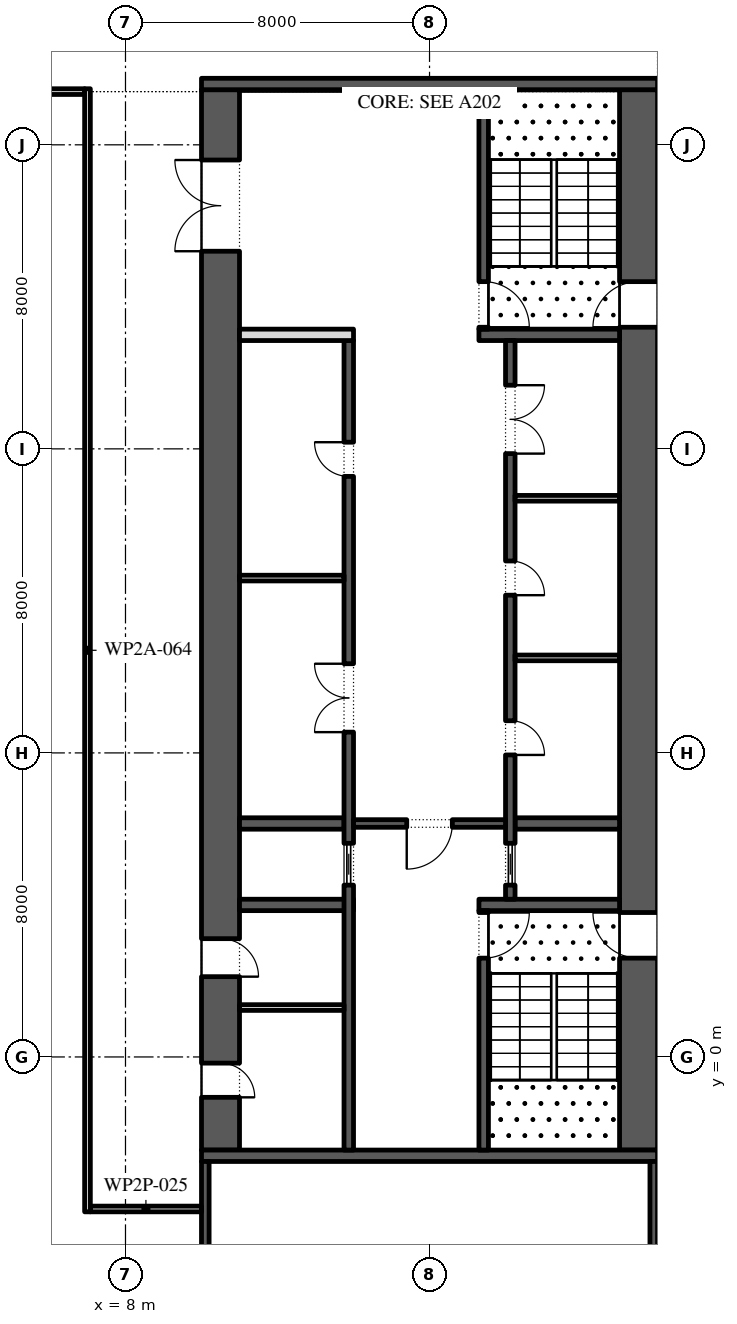
"""IFC4 building model, lengths in metres.
Left out: names, types, materials, properties, quantities, classifications, styles, units other than length and angle.
Written with IfcOpenShell. Run it as: python <this file> out.ifc"""

import sys

from ifc_helpers import new_model, si_unit, direction, frame, frame_2d, origin, place, context, subcontext, project, spatial, rectangle, extrude, element, fill, save


model = new_model("IFC4")
c1 = context("Model", 3, precision=1e-05, world=origin(), true_north=direction((0.0, 1.0)))
c2 = subcontext(c1, "Body", "Model", "MODEL_VIEW")
j1 = project(units=[si_unit("LENGTHUNIT", "METRE"), si_unit("PLANEANGLEUNIT", "RADIAN")], contexts=[c1])
p1 = place(None, origin())
s1 = spatial("IfcSite", under=j1, at=p1, CompositionType="ELEMENT")
p2 = place(p1, origin())
s2 = spatial("IfcBuilding", under=s1, at=p2, CompositionType="ELEMENT")
p3 = place(p2, frame((0.0, 0.0, -5.2)))
s3 = spatial("IfcBuildingStorey", under=s2, at=p3, CompositionType="ELEMENT", Elevation=-5.2)
p4 = place(p3, frame((21.5, -2.45, 0.0), z_axis=(0.0, 0.0, 1.0), x_axis=(0.0, 1.0, 0.0)))
e1 = element("IfcWall", 1, at=p4, inside=s3, PredefinedType="SHEAR", context=c2, shape_type="SweptSolid", body=[
    extrude(rectangle(XDim=27.9, YDim=1.0, at=frame_2d((13.95, 0.0))), origin(), (0.0, 0.0, 1.0), 4.9),
])
p5 = place(p4, frame((5.05, 0.0, 0.0)))
e2 = element("IfcOpeningElement", 2, at=p5, cuts=e1, PredefinedType="OPENING", context=c2, shape_type="SweptSolid", body=[
    extrude(rectangle(XDim=1.2, YDim=2.1, at=frame_2d((0.6, 1.05))), frame((0.0, 0.51, 0.0), z_axis=(0.0, -1.0, 0.0), x_axis=(1.0, 0.0, 0.0)), (0.0, 0.0, 1.0), 1.02),
])
p6 = place(p4, frame((21.65, 0.0, 0.0)))
e3 = element("IfcOpeningElement", 3, at=p6, cuts=e1, PredefinedType="OPENING", context=c2, shape_type="SweptSolid", body=[
    extrude(rectangle(XDim=1.2, YDim=2.1, at=frame_2d((0.6, 1.05))), frame((0.0, 0.51, 0.0), z_axis=(0.0, -1.0, 0.0), x_axis=(1.0, 0.0, 0.0)), (0.0, 0.0, 1.0), 1.02),
])
p7 = place(p3, frame((10.5, -2.45, 0.0), z_axis=(0.0, 0.0, 1.0), x_axis=(0.0, 1.0, 0.0)))
e4 = element("IfcWall", 4, at=p7, inside=s3, PredefinedType="SHEAR", context=c2, shape_type="SweptSolid", body=[
    extrude(rectangle(XDim=27.9, YDim=1.0, at=frame_2d((13.95, 0.0))), origin(), (0.0, 0.0, 1.0), 4.9),
])
p8 = place(p7, frame((23.65, 0.0, 0.0)))
e5 = element("IfcOpeningElement", 5, at=p8, cuts=e4, PredefinedType="OPENING", context=c2, shape_type="SweptSolid", body=[
    extrude(rectangle(XDim=2.4, YDim=2.1, at=frame_2d((1.2, 1.05))), frame((0.0, 0.51, 0.0), z_axis=(0.0, -1.0, 0.0), x_axis=(1.0, 0.0, 0.0)), (0.0, 0.0, 1.0), 1.02),
])
p9 = place(p7, frame((1.387, 0.0, 0.0)))
e6 = element("IfcOpeningElement", 6, at=p9, cuts=e4, PredefinedType="OPENING", context=c2, shape_type="SweptSolid", body=[
    extrude(rectangle(XDim=0.9, YDim=2.1, at=frame_2d((0.45, 1.05))), frame((0.0, 0.51, 0.0), z_axis=(0.0, -1.0, 0.0), x_axis=(1.0, 0.0, 0.0)), (0.0, 0.0, 1.0), 1.02),
])
p10 = place(p7, frame((4.562, 0.0, 0.0)))
e7 = element("IfcOpeningElement", 7, at=p10, cuts=e4, PredefinedType="OPENING", context=c2, shape_type="SweptSolid", body=[
    extrude(rectangle(XDim=1.0, YDim=2.1, at=frame_2d((0.5, 1.05))), frame((0.0, 0.51, 0.0), z_axis=(0.0, -1.0, 0.0), x_axis=(1.0, 0.0, 0.0)), (0.0, 0.0, 1.0), 1.02),
])
for number, where, z_axis, x_axis in (
    (8, (10.0, -2.6, 0.0), (0.0, 0.0, 1.0), (1.0, 0.0, 0.0)),
    (9, (10.0, 25.6, 0.0), (0.0, 0.0, 1.0), (1.0, 0.0, 0.0)),
):
    element("IfcWall", number, at=place(p3, frame(where, z_axis=z_axis, x_axis=x_axis)), inside=s3, PredefinedType="SHEAR", context=c2, shape_type="SweptSolid", body=[
        extrude(rectangle(XDim=12.0, YDim=0.3, at=frame_2d((6.0, 0.0))), origin(), (0.0, 0.0, 1.0), 4.9),
    ])
p11 = place(p3, frame((17.3, 4.0, 0.0), z_axis=(0.0, 0.0, 1.0), x_axis=(1.0, 0.0, 0.0)))
e10 = element("IfcWall", 10, at=p11, inside=s3, PredefinedType="SHEAR", context=c2, shape_type="SweptSolid", body=[
    extrude(rectangle(XDim=3.7, YDim=0.3, at=frame_2d((1.85, 0.0))), origin(), (0.0, 0.0, 1.0), 4.9),
])
p12 = place(p3, frame((17.425, -2.45, 0.0), z_axis=(0.0, 0.0, 1.0), x_axis=(0.0, 1.0, 0.0)))
e11 = element("IfcWall", 11, at=p12, inside=s3, PredefinedType="SHEAR", context=c2, shape_type="SweptSolid", body=[
    extrude(rectangle(XDim=6.3, YDim=0.25, at=frame_2d((3.15, 0.0))), origin(), (0.0, 0.0, 1.0), 4.9),
])
p13 = place(p12, frame((5.05, 0.0, 0.0)))
e12 = element("IfcOpeningElement", 12, at=p13, cuts=e11, PredefinedType="OPENING", context=c2, shape_type="SweptSolid", body=[
    extrude(rectangle(XDim=1.2, YDim=2.1, at=frame_2d((0.6, 1.05))), frame((0.0, 0.135, 0.0), z_axis=(0.0, -1.0, 0.0), x_axis=(1.0, 0.0, 0.0)), (0.0, 0.0, 1.0), 0.27),
])
p14 = place(p3, frame((17.3, 19.0, 0.0), z_axis=(0.0, 0.0, 1.0), x_axis=(1.0, 0.0, 0.0)))
e13 = element("IfcWall", 13, at=p14, inside=s3, PredefinedType="SHEAR", context=c2, shape_type="SweptSolid", body=[
    extrude(rectangle(XDim=3.7, YDim=0.3, at=frame_2d((1.85, 0.0))), origin(), (0.0, 0.0, 1.0), 4.9),
])
p15 = place(p3, frame((17.425, 19.15, 0.0), z_axis=(0.0, 0.0, 1.0), x_axis=(0.0, 1.0, 0.0)))
e14 = element("IfcWall", 14, at=p15, inside=s3, PredefinedType="SHEAR", context=c2, shape_type="SweptSolid", body=[
    extrude(rectangle(XDim=6.3, YDim=0.25, at=frame_2d((3.15, 0.0))), origin(), (0.0, 0.0, 1.0), 4.9),
])
p16 = place(p15, frame((0.05, 0.0, 0.0)))
e15 = element("IfcOpeningElement", 15, at=p16, cuts=e14, PredefinedType="OPENING", context=c2, shape_type="SweptSolid", body=[
    extrude(rectangle(XDim=1.2, YDim=2.1, at=frame_2d((0.6, 1.05))), frame((0.0, 0.135, 0.0), z_axis=(0.0, -1.0, 0.0), x_axis=(1.0, 0.0, 0.0)), (0.0, 0.0, 1.0), 0.27),
])
p17 = place(p3, frame((18.25, 6.143, 0.0), z_axis=(0.0, 0.0, 1.0), x_axis=(1.0, 0.0, 0.0)))
e16 = element("IfcWall", 16, at=p17, inside=s3, PredefinedType="SHEAR", context=c2, shape_type="SweptSolid", body=[
    extrude(rectangle(XDim=2.75, YDim=0.3, at=frame_2d((1.375, 0.0))), origin(), (0.0, 0.0, 1.0), 4.9),
])
p18 = place(p3, frame((18.125, 4.15, 0.0), z_axis=(0.0, 0.0, 1.0), x_axis=(0.0, 1.0, 0.0)))
e17 = element("IfcWall", 17, at=p18, inside=s3, PredefinedType="SHEAR", context=c2, shape_type="SweptSolid", body=[
    extrude(rectangle(XDim=14.7, YDim=0.25, at=frame_2d((7.35, 0.0))), origin(), (0.0, 0.0, 1.0), 4.9),
])
p19 = place(p18, frame((3.796, 0.0, 0.0)))
e18 = element("IfcOpeningElement", 18, at=p19, cuts=e17, PredefinedType="OPENING", context=c2, shape_type="SweptSolid", body=[
    extrude(rectangle(XDim=0.9, YDim=2.1, at=frame_2d((0.45, 1.05))), frame((0.0, 0.135, 0.0), z_axis=(0.0, -1.0, 0.0), x_axis=(1.0, 0.0, 0.0)), (0.0, 0.0, 1.0), 0.27),
])
p20 = place(p18, frame((8.0, 0.0, 0.0)))
e19 = element("IfcOpeningElement", 19, at=p20, cuts=e17, PredefinedType="OPENING", context=c2, shape_type="SweptSolid", body=[
    extrude(rectangle(XDim=0.9, YDim=2.1, at=frame_2d((0.45, 1.05))), frame((0.0, 0.135, 0.0), z_axis=(0.0, -1.0, 0.0), x_axis=(1.0, 0.0, 0.0)), (0.0, 0.0, 1.0), 0.27),
])
p21 = place(p18, frame((11.725, 0.0, 0.0)))
e20 = element("IfcOpeningElement", 20, at=p21, cuts=e17, PredefinedType="OPENING", context=c2, shape_type="SweptSolid", body=[
    extrude(rectangle(XDim=1.8, YDim=2.4, at=frame_2d((0.9, 1.2))), frame((0.0, 0.135, 0.0), z_axis=(0.0, -1.0, 0.0), x_axis=(1.0, 0.0, 0.0)), (0.0, 0.0, 1.0), 0.27),
])
p22 = place(p18, frame((0.371, 0.0, 0.0)))
e21 = element("IfcOpeningElement", 21, at=p22, cuts=e17, PredefinedType="OPENING", context=c2, shape_type="SweptSolid", body=[
    extrude(rectangle(XDim=1.1, YDim=2.1, at=frame_2d((0.55, 1.05))), frame((0.0, 0.135, 0.0), z_axis=(0.0, -1.0, 0.0), x_axis=(1.0, 0.0, 0.0)), (0.0, 0.0, 1.0), 0.27),
])
for number, where, z_axis, x_axis in (
    (22, (18.25, 10.5, 0.0), (0.0, 0.0, 1.0), (1.0, 0.0, 0.0)),
    (23, (18.25, 14.7, 0.0), (0.0, 0.0, 1.0), (1.0, 0.0, 0.0)),
):
    element("IfcWall", number, at=place(p3, frame(where, z_axis=z_axis, x_axis=x_axis)), inside=s3, PredefinedType="PARTITIONING", context=c2, shape_type="SweptSolid", body=[
        extrude(rectangle(XDim=2.75, YDim=0.15, at=frame_2d((1.375, 0.0))), origin(), (0.0, 0.0, 1.0), 4.9),
    ])
p23 = place(p3, frame((11.0, 4.0, 0.0), z_axis=(0.0, 0.0, 1.0), x_axis=(1.0, 0.0, 0.0)))
e24 = element("IfcWall", 24, at=p23, inside=s3, PredefinedType="SHEAR", context=c2, shape_type="SweptSolid", body=[
    extrude(rectangle(XDim=3.0, YDim=0.3, at=frame_2d((1.5, 0.0))), origin(), (0.0, 0.0, 1.0), 4.9),
])
p24 = place(p3, frame((11.0, 6.143, 0.0), z_axis=(0.0, 0.0, 1.0), x_axis=(1.0, 0.0, 0.0)))
e25 = element("IfcWall", 25, at=p24, inside=s3, PredefinedType="SHEAR", context=c2, shape_type="SweptSolid", body=[
    extrude(rectangle(XDim=2.75, YDim=0.3, at=frame_2d((1.375, 0.0))), origin(), (0.0, 0.0, 1.0), 4.9),
])
p25 = place(p3, frame((13.875, -2.45, 0.0), z_axis=(0.0, 0.0, 1.0), x_axis=(0.0, 1.0, 0.0)))
e26 = element("IfcWall", 26, at=p25, inside=s3, PredefinedType="SHEAR", context=c2, shape_type="SweptSolid", body=[
    extrude(rectangle(XDim=21.3, YDim=0.25, at=frame_2d((10.65, 0.0))), origin(), (0.0, 0.0, 1.0), 4.9),
])
p26 = place(p25, frame((10.996, 0.0, 0.0)))
e27 = element("IfcOpeningElement", 27, at=p26, cuts=e26, PredefinedType="OPENING", context=c2, shape_type="SweptSolid", body=[
    extrude(rectangle(XDim=1.8, YDim=2.4, at=frame_2d((0.9, 1.2))), frame((0.0, 0.135, 0.0), z_axis=(0.0, -1.0, 0.0), x_axis=(1.0, 0.0, 0.0)), (0.0, 0.0, 1.0), 0.27),
])
p27 = place(p25, frame((17.725, 0.0, 0.0)))
e28 = element("IfcOpeningElement", 28, at=p27, cuts=e26, PredefinedType="OPENING", context=c2, shape_type="SweptSolid", body=[
    extrude(rectangle(XDim=0.9, YDim=2.1, at=frame_2d((0.45, 1.05))), frame((0.0, 0.135, 0.0), z_axis=(0.0, -1.0, 0.0), x_axis=(1.0, 0.0, 0.0)), (0.0, 0.0, 1.0), 0.27),
])
p28 = place(p25, frame((6.971, 0.0, 0.0)))
e29 = element("IfcOpeningElement", 29, at=p28, cuts=e26, PredefinedType="OPENING", context=c2, shape_type="SweptSolid", body=[
    extrude(rectangle(XDim=1.1, YDim=2.1, at=frame_2d((0.55, 1.05))), frame((0.0, 0.135, 0.0), z_axis=(0.0, -1.0, 0.0), x_axis=(1.0, 0.0, 0.0)), (0.0, 0.0, 1.0), 0.27),
])
p29 = place(p3, frame((11.0, 19.0, 0.0), z_axis=(0.0, 0.0, 1.0), x_axis=(1.0, 0.0, 0.0)))
e30 = element("IfcWall", 30, at=p29, inside=s3, PredefinedType="PARTITIONING", context=c2, shape_type="SweptSolid", body=[
    extrude(rectangle(XDim=3.0, YDim=0.3, at=frame_2d((1.5, 0.0))), origin(), (0.0, 0.0, 1.0), 4.9),
])
p30 = place(p3, frame((11.0, 12.6, 0.0), z_axis=(0.0, 0.0, 1.0), x_axis=(1.0, 0.0, 0.0)))
e31 = element("IfcWall", 31, at=p30, inside=s3, PredefinedType="PARTITIONING", context=c2, shape_type="SweptSolid", body=[
    extrude(rectangle(XDim=2.75, YDim=0.15, at=frame_2d((1.375, 0.0))), origin(), (0.0, 0.0, 1.0), 4.9),
])
p31 = place(p3, frame((14.0, 6.143, 0.0), z_axis=(0.0, 0.0, 1.0), x_axis=(1.0, 0.0, 0.0)))
e32 = element("IfcWall", 32, at=p31, inside=s3, PredefinedType="SHEAR", context=c2, shape_type="SweptSolid", body=[
    extrude(rectangle(XDim=4.0, YDim=0.2, at=frame_2d((2.0, 0.0))), origin(), (0.0, 0.0, 1.0), 4.9),
])
p32 = place(p31, frame((1.4, 0.0, 0.0)))
e33 = element("IfcOpeningElement", 33, at=p32, cuts=e32, PredefinedType="OPENING", context=c2, shape_type="SweptSolid", body=[
    extrude(rectangle(XDim=1.2, YDim=2.1, at=frame_2d((0.6, 1.05))), frame((0.0, 0.11, 0.0), z_axis=(0.0, -1.0, 0.0), x_axis=(1.0, 0.0, 0.0)), (0.0, 0.0, 1.0), 0.22),
])
p33 = place(p3, frame((11.0, 1.3, 0.0), z_axis=(0.0, 0.0, 1.0), x_axis=(1.0, 0.0, 0.0)))
e34 = element("IfcWall", 34, at=p33, inside=s3, PredefinedType="PARTITIONING", context=c2, shape_type="SweptSolid", body=[
    extrude(rectangle(XDim=2.75, YDim=0.15, at=frame_2d((1.375, 0.0))), origin(), (0.0, 0.0, 1.0), 4.9),
])
p34 = place(p3, frame((21.9, -15.8, 0.0), z_axis=(0.0, 0.0, 1.0), x_axis=(0.0, 1.0, 0.0)))
e35 = element("IfcWall", 35, at=p34, inside=s3, PredefinedType="SHEAR", context=c2, shape_type="SweptSolid", body=[
    extrude(rectangle(XDim=13.05, YDim=0.2, at=frame_2d((6.525, 0.0))), origin(), (0.0, 0.0, 1.0), 4.9),
])
p35 = place(p3, frame((10.1, -15.8, 0.0), z_axis=(0.0, 0.0, 1.0), x_axis=(0.0, 1.0, 0.0)))
e36 = element("IfcWall", 36, at=p35, inside=s3, PredefinedType="SHEAR", context=c2, shape_type="SweptSolid", body=[
    extrude(rectangle(XDim=13.05, YDim=0.2, at=frame_2d((6.525, 0.0))), origin(), (0.0, 0.0, 1.0), 4.9),
])
p36 = place(p35, frame((6.075, 0.0, 0.0)))
e37 = element("IfcOpeningElement", 37, at=p36, cuts=e36, PredefinedType="OPENING", context=c2, shape_type="SweptSolid", body=[
    extrude(rectangle(XDim=0.9, YDim=2.1, at=frame_2d((0.45, 1.05))), frame((0.0, 0.11, 0.0), z_axis=(0.0, -1.0, 0.0), x_axis=(1.0, 0.0, 0.0)), (0.0, 0.0, 1.0), 0.22),
])
p37 = place(p3, frame((7.075, -4.0, 0.0), z_axis=(0.0, 0.0, 1.0), x_axis=(1.0, 0.0, 0.0)))
e38 = element("IfcWall", 38, at=p37, inside=s3, PredefinedType="PARTITIONING", context=c2, shape_type="SweptSolid", body=[
    extrude(rectangle(XDim=2.925, YDim=0.15, at=frame_2d((1.462, 0.0))), origin(), (0.0, 0.0, 1.0), 3.93),
])
p38 = place(p3, frame((1.575, 25.4, 0.0), z_axis=(0.0, 0.0, 1.0), x_axis=(1.0, 0.0, 0.0)))
e39 = element("IfcWall", 39, at=p38, inside=s3, PredefinedType="PARTITIONING", context=c2, shape_type="SweptSolid", body=[
    extrude(rectangle(XDim=5.35, YDim=0.15, at=frame_2d((2.675, 0.0))), origin(), (0.0, 0.0, 1.0), 4.9),
])
p39 = place(p3, frame((7.0, -4.075, 0.0), z_axis=(0.0, 0.0, 1.0), x_axis=(0.0, 1.0, 0.0)))
e40 = element("IfcWall", 40, at=p39, inside=s3, PredefinedType="PARTITIONING", context=c2, shape_type="SweptSolid", body=[
    extrude(rectangle(XDim=29.55, YDim=0.15, at=frame_2d((14.775, 0.0))), origin(), (0.0, 0.0, 1.0), 4.9),
])
p40 = place(p19, frame((0.9, -0.2, 0.0), z_axis=(0.0, 0.0, 1.0), x_axis=(-1.0, 0.0, 0.0)))
e41 = element("IfcDoor", 41, at=p40, inside=s3, OperationType="SINGLE_SWING_LEFT", PredefinedType="DOOR", context=c2, shape_type="SweptSolid", body=[
    extrude(rectangle(XDim=0.9, YDim=2.1, at=frame_2d((0.45, 1.05))), frame((0.0, -0.075, 0.0), z_axis=(0.0, -1.0, 0.0), x_axis=(1.0, 0.0, 0.0)), (0.0, 0.0, 1.0), 0.05),
])
fill(e18, e41)
p41 = place(p20, frame((0.9, -0.2, 0.0), z_axis=(0.0, 0.0, 1.0), x_axis=(-1.0, 0.0, 0.0)))
e42 = element("IfcDoor", 42, at=p41, inside=s3, OperationType="SINGLE_SWING_LEFT", PredefinedType="DOOR", context=c2, shape_type="SweptSolid", body=[
    extrude(rectangle(XDim=0.9, YDim=2.1, at=frame_2d((0.45, 1.05))), frame((0.0, -0.075, 0.0), z_axis=(0.0, -1.0, 0.0), x_axis=(1.0, 0.0, 0.0)), (0.0, 0.0, 1.0), 0.05),
])
fill(e19, e42)
p42 = place(p21, frame((1.8, -0.2, 0.0), z_axis=(0.0, 0.0, 1.0), x_axis=(-1.0, 0.0, 0.0)))
e43 = element("IfcDoor", 43, at=p42, inside=s3, OperationType="DOUBLE_DOOR_SINGLE_SWING", PredefinedType="DOOR", context=c2, shape_type="SweptSolid", body=[
    extrude(rectangle(XDim=1.8, YDim=2.4, at=frame_2d((0.9, 1.2))), frame((0.0, -0.075, 0.0), z_axis=(0.0, -1.0, 0.0), x_axis=(1.0, 0.0, 0.0)), (0.0, 0.0, 1.0), 0.05),
])
fill(e20, e43)
p43 = place(p22, origin())
e44 = element("IfcDoor", 44, at=p43, inside=s3, OperationType="SLIDING_TO_LEFT", PredefinedType="DOOR", context=c2, shape_type="SweptSolid", body=[
    extrude(rectangle(XDim=1.1, YDim=2.1, at=frame_2d((0.55, 1.05))), frame((0.0, 0.025, 0.0), z_axis=(0.0, -1.0, 0.0), x_axis=(1.0, 0.0, 0.0)), (0.0, 0.0, 1.0), 0.05),
])
fill(e21, e44)
p44 = place(p26, origin())
e45 = element("IfcDoor", 45, at=p44, inside=s3, OperationType="DOUBLE_DOOR_SINGLE_SWING", PredefinedType="DOOR", context=c2, shape_type="SweptSolid", body=[
    extrude(rectangle(XDim=1.8, YDim=2.4, at=frame_2d((0.9, 1.2))), frame((0.0, 0.125, 0.0), z_axis=(0.0, -1.0, 0.0), x_axis=(1.0, 0.0, 0.0)), (0.0, 0.0, 1.0), 0.05),
])
fill(e27, e45)
p45 = place(p27, origin())
e46 = element("IfcDoor", 46, at=p45, inside=s3, OperationType="SINGLE_SWING_LEFT", PredefinedType="DOOR", context=c2, shape_type="SweptSolid", body=[
    extrude(rectangle(XDim=0.9, YDim=2.1, at=frame_2d((0.45, 1.05))), frame((0.0, 0.125, 0.0), z_axis=(0.0, -1.0, 0.0), x_axis=(1.0, 0.0, 0.0)), (0.0, 0.0, 1.0), 0.05),
])
fill(e28, e46)
p46 = place(p28, origin())
e47 = element("IfcDoor", 47, at=p46, inside=s3, OperationType="SLIDING_TO_LEFT", PredefinedType="DOOR", context=c2, shape_type="SweptSolid", body=[
    extrude(rectangle(XDim=1.1, YDim=2.1, at=frame_2d((0.55, 1.05))), frame((0.0, 0.025, 0.0), z_axis=(0.0, -1.0, 0.0), x_axis=(1.0, 0.0, 0.0)), (0.0, 0.0, 1.0), 0.05),
])
fill(e29, e47)
p47 = place(p32, frame((1.2, 0.0, 0.0), z_axis=(0.0, 0.0, 1.0), x_axis=(-1.0, 0.0, 0.0)))
e48 = element("IfcDoor", 48, at=p47, inside=s3, OperationType="SINGLE_SWING_LEFT", PredefinedType="DOOR", context=c2, shape_type="SweptSolid", body=[
    extrude(rectangle(XDim=1.2, YDim=2.1, at=frame_2d((0.6, 1.05))), frame((0.0, 0.025, 0.0), z_axis=(0.0, -1.0, 0.0), x_axis=(1.0, 0.0, 0.0)), (0.0, 0.0, 1.0), 0.05),
])
fill(e33, e48)
p48 = place(p8, origin())
e49 = element("IfcDoor", 49, at=p48, inside=s3, OperationType="DOUBLE_DOOR_SINGLE_SWING", PredefinedType="DOOR", context=c2, shape_type="SweptSolid", body=[
    extrude(rectangle(XDim=2.4, YDim=2.1, at=frame_2d((1.2, 1.05))), frame((0.0, 0.025, 0.0), z_axis=(0.0, -1.0, 0.0), x_axis=(1.0, 0.0, 0.0)), (0.0, 0.0, 1.0), 0.05),
])
fill(e5, e49)
p49 = place(p13, frame((1.2, 0.0, 0.0), z_axis=(0.0, 0.0, 1.0), x_axis=(-1.0, 0.0, 0.0)))
e50 = element("IfcDoor", 50, at=p49, inside=s3, OperationType="SINGLE_SWING_RIGHT", PredefinedType="DOOR", context=c2, shape_type="SweptSolid", body=[
    extrude(rectangle(XDim=1.2, YDim=2.1, at=frame_2d((0.6, 1.05))), frame((0.0, 0.025, 0.0), z_axis=(0.0, -1.0, 0.0), x_axis=(1.0, 0.0, 0.0)), (0.0, 0.0, 1.0), 0.05),
])
fill(e12, e50)
p50 = place(p5, origin())
e51 = element("IfcDoor", 51, at=p50, inside=s3, OperationType="SINGLE_SWING_LEFT", PredefinedType="DOOR", context=c2, shape_type="SweptSolid", body=[
    extrude(rectangle(XDim=1.2, YDim=2.1, at=frame_2d((0.6, 1.05))), frame((0.0, 0.025, 0.0), z_axis=(0.0, -1.0, 0.0), x_axis=(1.0, 0.0, 0.0)), (0.0, 0.0, 1.0), 0.05),
])
fill(e2, e51)
p51 = place(p16, frame((1.2, 0.0, 0.0), z_axis=(0.0, 0.0, 1.0), x_axis=(-1.0, 0.0, 0.0)))
e52 = element("IfcDoor", 52, at=p51, inside=s3, OperationType="SINGLE_SWING_LEFT", PredefinedType="DOOR", context=c2, shape_type="SweptSolid", body=[
    extrude(rectangle(XDim=1.2, YDim=2.1, at=frame_2d((0.6, 1.05))), frame((0.0, 0.025, 0.0), z_axis=(0.0, -1.0, 0.0), x_axis=(1.0, 0.0, 0.0)), (0.0, 0.0, 1.0), 0.05),
])
fill(e15, e52)
p52 = place(p6, origin())
e53 = element("IfcDoor", 53, at=p52, inside=s3, OperationType="SINGLE_SWING_RIGHT", PredefinedType="DOOR", context=c2, shape_type="SweptSolid", body=[
    extrude(rectangle(XDim=1.2, YDim=2.1, at=frame_2d((0.6, 1.05))), frame((0.0, 0.025, 0.0), z_axis=(0.0, -1.0, 0.0), x_axis=(1.0, 0.0, 0.0)), (0.0, 0.0, 1.0), 0.05),
])
fill(e3, e53)
p53 = place(p9, frame((0.9, -0.95, 0.0), z_axis=(0.0, 0.0, 1.0), x_axis=(-1.0, 0.0, 0.0)))
e54 = element("IfcDoor", 54, at=p53, inside=s3, OperationType="SINGLE_SWING_LEFT", PredefinedType="DOOR", context=c2, shape_type="SweptSolid", body=[
    extrude(rectangle(XDim=0.9, YDim=2.1, at=frame_2d((0.45, 1.05))), frame((0.0, -0.45, 0.0), z_axis=(0.0, -1.0, 0.0), x_axis=(1.0, 0.0, 0.0)), (0.0, 0.0, 1.0), 0.05),
])
fill(e6, e54)
p54 = place(p10, frame((1.0, -0.95, 0.0), z_axis=(0.0, 0.0, 1.0), x_axis=(-1.0, 0.0, 0.0)))
e55 = element("IfcDoor", 55, at=p54, inside=s3, OperationType="SINGLE_SWING_LEFT", PredefinedType="DOOR", context=c2, shape_type="SweptSolid", body=[
    extrude(rectangle(XDim=1.0, YDim=2.1, at=frame_2d((0.5, 1.05))), frame((0.0, -0.45, 0.0), z_axis=(0.0, -1.0, 0.0), x_axis=(1.0, 0.0, 0.0)), (0.0, 0.0, 1.0), 0.05),
])
fill(e7, e55)
save(model, sys.argv[1])
